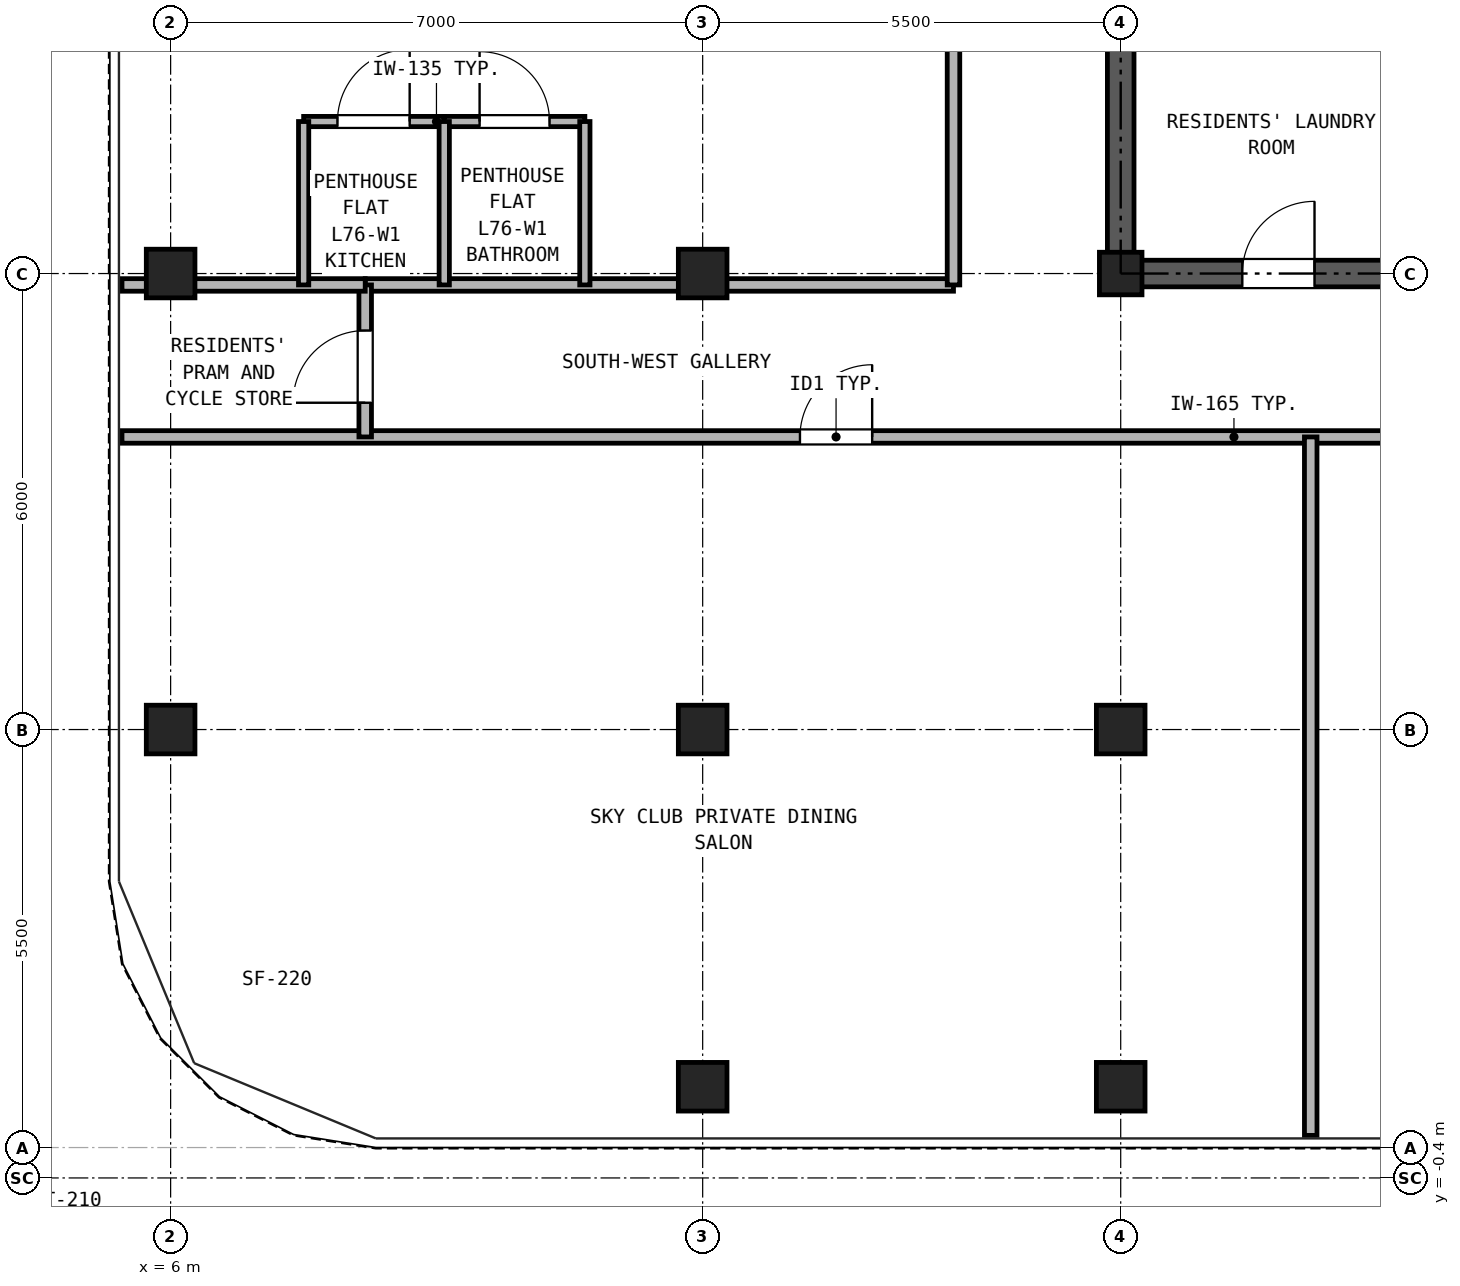
"""IFC4 building model, lengths in metres.
Left out: names, types, materials, properties, quantities, classifications, styles, units other than length and angle.
Written with IfcOpenShell. Run it as: python <this file> out.ifc"""

import sys

from ifc_helpers import new_model, si_unit, direction, frame, frame_2d, origin, origin_2d, place, context, subcontext, project, spatial, rectangle, hollow_rectangle, extrude, source, transform, mapped, element, fill, save


model = new_model("IFC4")
c1 = context("Model", 3, precision=1e-05, world=origin(), true_north=direction((0.0, 1.0)))
c2 = subcontext(c1, "Body", "Model", "MODEL_VIEW")
j1 = project(units=[si_unit("LENGTHUNIT", "METRE"), si_unit("PLANEANGLEUNIT", "RADIAN")], contexts=[c1])
p1 = place(None, origin())
s1 = spatial("IfcSite", under=j1, at=p1, CompositionType="ELEMENT")
p2 = place(p1, origin())
s2 = spatial("IfcBuilding", under=s1, at=p2, CompositionType="ELEMENT")
p3 = place(p2, frame((0.0, 0.0, 264.9)))
s3 = spatial("IfcBuildingStorey", under=s2, at=p3, CompositionType="ELEMENT", Elevation=264.9)
m1 = source(origin(), c2, "Body", "SweptSolid", [
    extrude(hollow_rectangle(XDim=0.64, YDim=0.64, WallThickness=0.035, at=origin_2d()), origin(), (0.0, 0.0, 1.0), 2.98),
])
for number, where, z_axis, x_axis in (
    (1, (13.0, 0.8, 0.0), (0.0, 0.0, 1.0), (1.0, 0.0, 0.0)),
    (2, (18.5, 0.8, 0.0), (0.0, 0.0, 1.0), (1.0, 0.0, 0.0)),
    (3, (6.0, 5.5, 0.0), (0.0, 0.0, 1.0), (1.0, 0.0, 0.0)),
    (4, (6.0, 11.5, 0.0), (0.0, 0.0, 1.0), (1.0, 0.0, 0.0)),
    (5, (13.0, 5.5, 0.0), (0.0, 0.0, 1.0), (1.0, 0.0, 0.0)),
    (6, (13.0, 11.5, 0.0), (0.0, 0.0, 1.0), (1.0, 0.0, 0.0)),
    (7, (18.5, 5.5, 0.0), (0.0, 0.0, 1.0), (1.0, 0.0, 0.0)),
):
    element("IfcColumn", number, at=place(p3, frame(where, z_axis=z_axis, x_axis=x_axis)), inside=s3, PredefinedType="COLUMN", context=c2, shape_type="MappedRepresentation", body=[
        mapped(m1, transform((0.0, 0.0, 0.0), x_axis=(1.0, 0.0, 0.0), y_axis=(0.0, 1.0, 0.0), z_axis=(0.0, 0.0, 1.0), scale=1.0)),
    ])
m2 = source(origin(), c2, "Body", "SweptSolid", [
    extrude(hollow_rectangle(XDim=0.56, YDim=0.56, WallThickness=0.03, at=origin_2d()), origin(), (0.0, 0.0, 1.0), 2.98),
])
p4 = place(p3, frame((18.5, 11.5, 0.0), z_axis=(0.0, 0.0, 1.0), x_axis=(1.0, 0.0, 0.0)))
e8 = element("IfcColumn", 8, at=p4, inside=s3, PredefinedType="COLUMN", context=c2, shape_type="MappedRepresentation", body=[
    mapped(m2, transform((0.0, 0.0, 0.0), x_axis=(1.0, 0.0, 0.0), y_axis=(0.0, 1.0, 0.0), z_axis=(0.0, 0.0, 1.0), scale=1.0)),
])
p5 = place(p3, frame((18.325, 11.5, 0.0), z_axis=(0.0, 0.0, 1.0), x_axis=(1.0, 0.0, 0.0)))
e9 = element("IfcWall", 9, at=p5, inside=s3, PredefinedType="SHEAR", context=c2, shape_type="SweptSolid", body=[
    extrude(rectangle(XDim=10.35, YDim=0.35, at=frame_2d((5.175, 0.0))), origin(), (0.0, 0.0, 1.0), 2.98),
])
p6 = place(p5, frame((1.775, 0.0, 0.0)))
e10 = element("IfcOpeningElement", 10, at=p6, cuts=e9, PredefinedType="OPENING", context=c2, shape_type="SweptSolid", body=[
    extrude(rectangle(XDim=0.95, YDim=2.15, at=frame_2d((0.475, 1.075))), frame((0.0, 0.185, 0.0), z_axis=(0.0, -1.0, 0.0), x_axis=(1.0, 0.0, 0.0)), (0.0, 0.0, 1.0), 0.37),
])
p7 = place(p5, frame((5.275, 0.0, 0.0)))
e11 = element("IfcOpeningElement", 11, at=p7, cuts=e9, PredefinedType="OPENING", context=c2, shape_type="SweptSolid", body=[
    extrude(rectangle(XDim=0.95, YDim=2.15, at=frame_2d((0.475, 1.075))), frame((0.0, 0.185, 0.0), z_axis=(0.0, -1.0, 0.0), x_axis=(1.0, 0.0, 0.0)), (0.0, 0.0, 1.0), 0.37),
])
p8 = place(p5, frame((8.175, 0.0, 0.0)))
e12 = element("IfcOpeningElement", 12, at=p8, cuts=e9, PredefinedType="OPENING", context=c2, shape_type="SweptSolid", body=[
    extrude(rectangle(XDim=1.1, YDim=2.25, at=frame_2d((0.55, 1.125))), frame((0.0, 0.185, 0.0), z_axis=(0.0, -1.0, 0.0), x_axis=(1.0, 0.0, 0.0)), (0.0, 0.0, 1.0), 0.37),
])
p9 = place(p3, frame((18.5, 11.675, 0.0), z_axis=(0.0, 0.0, 1.0), x_axis=(0.0, 1.0, 0.0)))
e13 = element("IfcWall", 13, at=p9, inside=s3, PredefinedType="SHEAR", context=c2, shape_type="SweptSolid", body=[
    extrude(rectangle(XDim=16.9, YDim=0.35, at=frame_2d((8.45, 0.0))), origin(), (0.0, 0.0, 1.0), 2.98),
])
p10 = place(p9, frame((7.475, 0.0, 0.0)))
e14 = element("IfcOpeningElement", 14, at=p10, cuts=e13, PredefinedType="OPENING", context=c2, shape_type="SweptSolid", body=[
    extrude(rectangle(XDim=1.15, YDim=2.2, at=frame_2d((0.575, 1.1))), frame((0.0, 0.185, 0.0), z_axis=(0.0, -1.0, 0.0), x_axis=(1.0, 0.0, 0.0)), (0.0, 0.0, 1.0), 0.37),
])
p11 = place(p3, frame((5.36, 9.35, 0.0), z_axis=(0.0, 0.0, 1.0), x_axis=(1.0, 0.0, 0.0)))
e15 = element("IfcWall", 15, at=p11, inside=s3, PredefinedType="PARTITIONING", context=c2, shape_type="SweptSolid", body=[
    extrude(rectangle(XDim=36.28, YDim=0.165, at=frame_2d((18.14, 0.0))), origin(), (0.0, 0.0, 1.0), 2.98),
])
p12 = place(p11, frame((8.92, 0.0, 0.0)))
e16 = element("IfcOpeningElement", 16, at=p12, cuts=e15, PredefinedType="OPENING", context=c2, shape_type="SweptSolid", body=[
    extrude(rectangle(XDim=0.95, YDim=2.15, at=frame_2d((0.475, 1.075))), frame((0.0, 0.093, 0.0), z_axis=(0.0, -1.0, 0.0), x_axis=(1.0, 0.0, 0.0)), (0.0, 0.0, 1.0), 0.185),
])
p13 = place(p11, frame((19.39, 0.0, 0.0)))
e17 = element("IfcOpeningElement", 17, at=p13, cuts=e15, PredefinedType="OPENING", context=c2, shape_type="SweptSolid", body=[
    extrude(rectangle(XDim=0.95, YDim=2.15, at=frame_2d((0.475, 1.075))), frame((0.0, 0.093, 0.0), z_axis=(0.0, -1.0, 0.0), x_axis=(1.0, 0.0, 0.0)), (0.0, 0.0, 1.0), 0.185),
])
p14 = place(p11, frame((25.99, 0.0, 0.0)))
e18 = element("IfcOpeningElement", 18, at=p14, cuts=e15, PredefinedType="OPENING", context=c2, shape_type="SweptSolid", body=[
    extrude(rectangle(XDim=0.95, YDim=2.15, at=frame_2d((0.475, 1.075))), frame((0.0, 0.093, 0.0), z_axis=(0.0, -1.0, 0.0), x_axis=(1.0, 0.0, 0.0)), (0.0, 0.0, 1.0), 0.185),
])
p15 = place(p11, frame((30.34, 0.0, 0.0)))
e19 = element("IfcOpeningElement", 19, at=p15, cuts=e15, PredefinedType="OPENING", context=c2, shape_type="SweptSolid", body=[
    extrude(rectangle(XDim=0.95, YDim=2.15, at=frame_2d((0.475, 1.075))), frame((0.0, 0.093, 0.0), z_axis=(0.0, -1.0, 0.0), x_axis=(1.0, 0.0, 0.0)), (0.0, 0.0, 1.0), 0.185),
])
p16 = place(p3, frame((8.56, 11.35, 0.0), z_axis=(0.0, 0.0, 1.0), x_axis=(1.0, 0.0, 0.0)))
e20 = element("IfcWall", 20, at=p16, inside=s3, PredefinedType="PARTITIONING", context=c2, shape_type="SweptSolid", body=[
    extrude(rectangle(XDim=7.74, YDim=0.165, at=frame_2d((3.87, 0.0))), origin(), (0.0, 0.0, 1.0), 2.428),
])
p17 = place(p3, frame((8.56, 9.35, 0.0), z_axis=(0.0, 0.0, 1.0), x_axis=(0.0, 1.0, 0.0)))
e21 = element("IfcWall", 21, at=p17, inside=s3, PredefinedType="PARTITIONING", context=c2, shape_type="SweptSolid", body=[
    extrude(rectangle(XDim=2.0, YDim=0.165, at=frame_2d((1.0, 0.0))), origin(), (0.0, 0.0, 1.0), 2.98),
])
p18 = place(p17, frame((0.45, 0.0, 0.0)))
e22 = element("IfcOpeningElement", 22, at=p18, cuts=e21, PredefinedType="OPENING", context=c2, shape_type="SweptSolid", body=[
    extrude(rectangle(XDim=0.95, YDim=2.15, at=frame_2d((0.475, 1.075))), frame((0.0, 0.093, 0.0), z_axis=(0.0, -1.0, 0.0), x_axis=(1.0, 0.0, 0.0)), (0.0, 0.0, 1.0), 0.185),
])
p19 = place(p3, frame((16.3, 11.35, 0.0), z_axis=(0.0, 0.0, 1.0), x_axis=(0.0, 1.0, 0.0)))
e23 = element("IfcWall", 23, at=p19, inside=s3, PredefinedType="PARTITIONING", context=c2, shape_type="SweptSolid", body=[
    extrude(rectangle(XDim=23.79, YDim=0.165, at=frame_2d((11.895, 0.0))), origin(), (0.0, 0.0, 1.0), 2.98),
])
p20 = place(p19, frame((9.15, 0.0, 0.0)))
e24 = element("IfcOpeningElement", 24, at=p20, cuts=e23, PredefinedType="OPENING", context=c2, shape_type="SweptSolid", body=[
    extrude(rectangle(XDim=1.0, YDim=2.15, at=frame_2d((0.5, 1.075))), frame((0.0, 0.093, 0.0), z_axis=(0.0, -1.0, 0.0), x_axis=(1.0, 0.0, 0.0)), (0.0, 0.0, 1.0), 0.185),
])
p21 = place(p3, frame((21.0, 0.16, 0.0), z_axis=(0.0, 0.0, 1.0), x_axis=(0.0, 1.0, 0.0)))
e25 = element("IfcWall", 25, at=p21, inside=s3, PredefinedType="PARTITIONING", context=c2, shape_type="SweptSolid", body=[
    extrude(rectangle(XDim=9.19, YDim=0.165, at=frame_2d((4.595, 0.0))), origin(), (0.0, 0.0, 1.0), 2.98),
])
p22 = place(p3, frame((5.36, 11.35, 0.0), z_axis=(0.0, 0.0, 1.0), x_axis=(1.0, 0.0, 0.0)))
e26 = element("IfcWall", 26, at=p22, inside=s3, PredefinedType="PARTITIONING", context=c2, shape_type="SweptSolid", body=[
    extrude(rectangle(XDim=3.2, YDim=0.165, at=frame_2d((1.6, 0.0))), origin(), (0.0, 0.0, 1.0), 2.428),
])
p23 = place(p3, frame((7.75, 13.5, 0.0), z_axis=(0.0, 0.0, 1.0), x_axis=(1.0, 0.0, 0.0)))
e27 = element("IfcWall", 27, at=p23, inside=s3, PredefinedType="PARTITIONING", context=c2, shape_type="SweptSolid", body=[
    extrude(rectangle(XDim=1.85, YDim=0.135, at=frame_2d((0.925, 0.0))), origin(), (0.0, 0.0, 1.0), 2.98),
])
p24 = place(p23, frame((0.445, 0.0, 0.0)))
e28 = element("IfcOpeningElement", 28, at=p24, cuts=e27, PredefinedType="OPENING", context=c2, shape_type="SweptSolid", body=[
    extrude(rectangle(XDim=0.95, YDim=2.15, at=frame_2d((0.475, 1.075))), frame((0.0, 0.077, 0.0), z_axis=(0.0, -1.0, 0.0), x_axis=(1.0, 0.0, 0.0)), (0.0, 0.0, 1.0), 0.155),
])
p25 = place(p3, frame((9.6, 13.5, 0.0), z_axis=(0.0, 0.0, 1.0), x_axis=(1.0, 0.0, 0.0)))
e29 = element("IfcWall", 29, at=p25, inside=s3, PredefinedType="PARTITIONING", context=c2, shape_type="SweptSolid", body=[
    extrude(rectangle(XDim=1.85, YDim=0.135, at=frame_2d((0.925, 0.0))), origin(), (0.0, 0.0, 1.0), 2.98),
])
p26 = place(p25, frame((0.465, 0.0, 0.0)))
e30 = element("IfcOpeningElement", 30, at=p26, cuts=e29, PredefinedType="OPENING", context=c2, shape_type="SweptSolid", body=[
    extrude(rectangle(XDim=0.92, YDim=2.1, at=frame_2d((0.46, 1.05))), frame((0.0, 0.077, 0.0), z_axis=(0.0, -1.0, 0.0), x_axis=(1.0, 0.0, 0.0)), (0.0, 0.0, 1.0), 0.155),
])
for number, where, z_axis, x_axis in (
    (31, (7.75, 11.35, 0.0), (0.0, 0.0, 1.0), (0.0, 1.0, 0.0)),
    (32, (9.6, 11.35, 0.0), (0.0, 0.0, 1.0), (0.0, 1.0, 0.0)),
    (33, (11.45, 11.35, 0.0), (0.0, 0.0, 1.0), (0.0, 1.0, 0.0)),
):
    element("IfcWall", number, at=place(p3, frame(where, z_axis=z_axis, x_axis=x_axis)), inside=s3, PredefinedType="PARTITIONING", context=c2, shape_type="SweptSolid", body=[
        extrude(rectangle(XDim=2.15, YDim=0.135, at=frame_2d((1.075, 0.0))), origin(), (0.0, 0.0, 1.0), 2.98),
    ])
p27 = place(p6, frame((0.95, 0.0, 0.0), z_axis=(0.0, 0.0, 1.0), x_axis=(-1.0, 0.0, 0.0)))
e34 = element("IfcDoor", 34, at=p27, inside=s3, OperationType="SINGLE_SWING_RIGHT", PredefinedType="DOOR", context=c2, shape_type="SweptSolid", body=[
    extrude(rectangle(XDim=0.95, YDim=2.15, at=frame_2d((0.475, 1.075))), frame((0.0, 0.025, 0.0), z_axis=(0.0, -1.0, 0.0), x_axis=(1.0, 0.0, 0.0)), (0.0, 0.0, 1.0), 0.05),
])
fill(e10, e34)
p28 = place(p12, frame((0.95, 0.0, 0.0), z_axis=(0.0, 0.0, 1.0), x_axis=(-1.0, 0.0, 0.0)))
e35 = element("IfcDoor", 35, at=p28, inside=s3, OperationType="SINGLE_SWING_RIGHT", PredefinedType="DOOR", context=c2, shape_type="SweptSolid", body=[
    extrude(rectangle(XDim=0.95, YDim=2.15, at=frame_2d((0.475, 1.075))), frame((0.0, 0.025, 0.0), z_axis=(0.0, -1.0, 0.0), x_axis=(1.0, 0.0, 0.0)), (0.0, 0.0, 1.0), 0.05),
])
fill(e16, e35)
p29 = place(p18, frame((0.95, 0.0, 0.0), z_axis=(0.0, 0.0, 1.0), x_axis=(-1.0, 0.0, 0.0)))
e36 = element("IfcDoor", 36, at=p29, inside=s3, OperationType="SINGLE_SWING_LEFT", PredefinedType="DOOR", context=c2, shape_type="SweptSolid", body=[
    extrude(rectangle(XDim=0.95, YDim=2.15, at=frame_2d((0.475, 1.075))), frame((0.0, 0.025, 0.0), z_axis=(0.0, -1.0, 0.0), x_axis=(1.0, 0.0, 0.0)), (0.0, 0.0, 1.0), 0.05),
])
fill(e22, e36)
p30 = place(p24, origin())
e37 = element("IfcDoor", 37, at=p30, inside=s3, OperationType="SINGLE_SWING_RIGHT", PredefinedType="DOOR", context=c2, shape_type="SweptSolid", body=[
    extrude(rectangle(XDim=0.95, YDim=2.15, at=frame_2d((0.475, 1.075))), frame((0.0, 0.025, 0.0), z_axis=(0.0, -1.0, 0.0), x_axis=(1.0, 0.0, 0.0)), (0.0, 0.0, 1.0), 0.05),
])
fill(e28, e37)
p31 = place(p26, origin())
e38 = element("IfcDoor", 38, at=p31, inside=s3, OperationType="SINGLE_SWING_LEFT", PredefinedType="DOOR", context=c2, shape_type="SweptSolid", body=[
    extrude(rectangle(XDim=0.92, YDim=2.1, at=frame_2d((0.46, 1.05))), frame((0.0, 0.025, 0.0), z_axis=(0.0, -1.0, 0.0), x_axis=(1.0, 0.0, 0.0)), (0.0, 0.0, 1.0), 0.05),
])
fill(e30, e38)
save(model, sys.argv[1])
